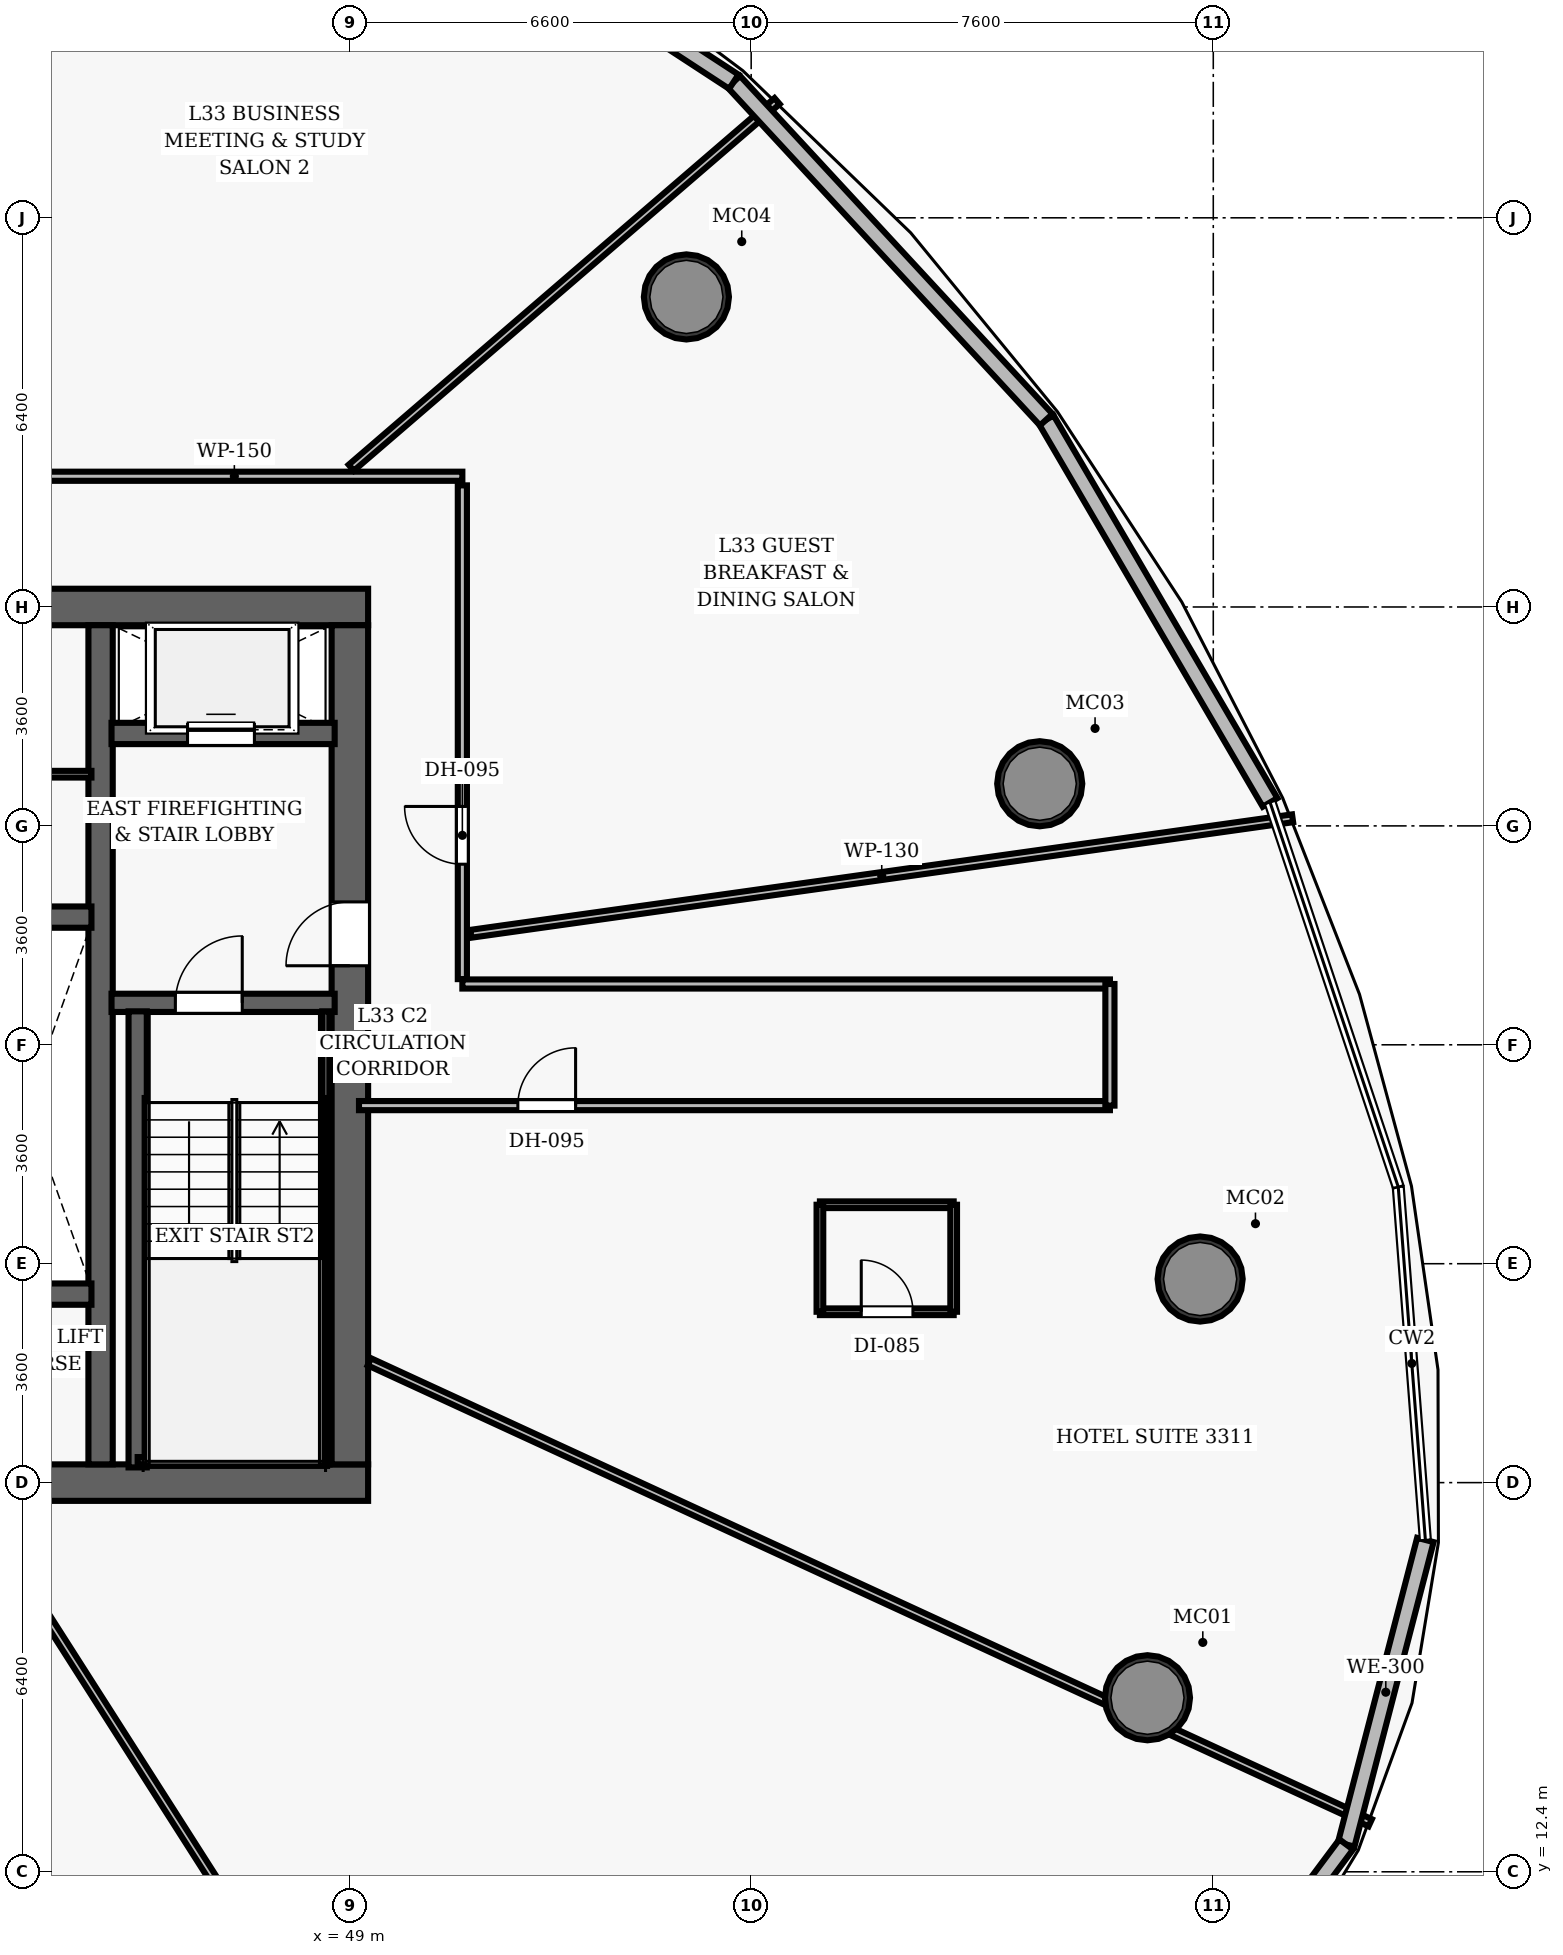
"""IFC4 building model, lengths in metres.
Left out: names, types, materials, properties, quantities, classifications, styles, units other than length and angle.
Written with IfcOpenShell. Run it as: python <this file> out.ifc"""

import sys

from ifc_helpers import new_model, si_unit, direction, frame, frame_2d, origin, origin_2d, place, context, subcontext, project, spatial, rectangle, hollow_circle, extrude, element, fill, save


model = new_model("IFC4")
c1 = context("Model", 3, precision=1e-05, world=origin(), true_north=direction((0.0, 1.0)))
c2 = subcontext(c1, "Body", "Model", "MODEL_VIEW")
j1 = project(units=[si_unit("LENGTHUNIT", "METRE"), si_unit("PLANEANGLEUNIT", "RADIAN")], contexts=[c1])
p1 = place(None, origin())
s1 = spatial("IfcSite", under=j1, at=p1, CompositionType="ELEMENT")
p2 = place(p1, origin())
s2 = spatial("IfcBuilding", under=s1, at=p2, CompositionType="ELEMENT")
p3 = place(p2, frame((0.0, 0.0, 134.3)))
s3 = spatial("IfcBuildingStorey", under=s2, at=p3, CompositionType="ELEMENT", Elevation=134.3)
p4 = place(p3, frame((26.7, 18.8, 0.0), z_axis=(0.0, 0.0, 1.0), x_axis=(1.0, 0.0, 0.0)))
e1 = element("IfcWall", 1, at=p4, inside=s3, PredefinedType="SHEAR", context=c2, shape_type="SweptSolid", body=[
    extrude(rectangle(XDim=22.6, YDim=0.6, at=frame_2d((11.3, 0.0))), origin(), (0.0, 0.0, 1.0), 3.5),
])
p5 = place(p4, frame((14.52, 0.0, 0.0)))
e2 = element("IfcOpeningElement", 2, at=p5, cuts=e1, PredefinedType="OPENING", context=c2, shape_type="SweptSolid", body=[
    extrude(rectangle(XDim=1.05, YDim=2.15, at=frame_2d((0.525, 1.075))), frame((0.0, 0.31, 0.0), z_axis=(0.0, -1.0, 0.0), x_axis=(1.0, 0.0, 0.0)), (0.0, 0.0, 1.0), 0.62),
])
p6 = place(p3, frame((26.7, 33.2, 0.0), z_axis=(0.0, 0.0, 1.0), x_axis=(1.0, 0.0, 0.0)))
e3 = element("IfcWall", 3, at=p6, inside=s3, PredefinedType="SHEAR", context=c2, shape_type="SweptSolid", body=[
    extrude(rectangle(XDim=22.6, YDim=0.6, at=frame_2d((11.3, 0.0))), origin(), (0.0, 0.0, 1.0), 3.5),
])
p7 = place(p6, frame((4.62, 0.0, 0.0)))
e4 = element("IfcOpeningElement", 4, at=p7, cuts=e3, PredefinedType="OPENING", context=c2, shape_type="SweptSolid", body=[
    extrude(rectangle(XDim=1.05, YDim=2.15, at=frame_2d((0.525, 1.075))), frame((0.0, 0.31, 0.0), z_axis=(0.0, -1.0, 0.0), x_axis=(1.0, 0.0, 0.0)), (0.0, 0.0, 1.0), 0.62),
])
p8 = place(p6, frame((14.52, 0.0, 0.0)))
e5 = element("IfcOpeningElement", 5, at=p8, cuts=e3, PredefinedType="OPENING", context=c2, shape_type="SweptSolid", body=[
    extrude(rectangle(XDim=1.05, YDim=2.15, at=frame_2d((0.525, 1.075))), frame((0.0, 0.31, 0.0), z_axis=(0.0, -1.0, 0.0), x_axis=(1.0, 0.0, 0.0)), (0.0, 0.0, 1.0), 0.62),
])
p9 = place(p3, frame((49.0, 19.1, 0.0), z_axis=(0.0, 0.0, 1.0), x_axis=(0.0, 1.0, 0.0)))
e6 = element("IfcWall", 6, at=p9, inside=s3, PredefinedType="SHEAR", context=c2, shape_type="SweptSolid", body=[
    extrude(rectangle(XDim=13.8, YDim=0.6, at=frame_2d((6.9, 0.0))), origin(), (0.0, 0.0, 1.0), 3.5),
])
p10 = place(p9, frame((8.2, 0.0, 0.0)))
e7 = element("IfcOpeningElement", 7, at=p10, cuts=e6, PredefinedType="OPENING", context=c2, shape_type="SweptSolid", body=[
    extrude(rectangle(XDim=1.05, YDim=2.15, at=frame_2d((0.525, 1.075))), frame((0.0, 0.31, 0.0), z_axis=(0.0, -1.0, 0.0), x_axis=(1.0, 0.0, 0.0)), (0.0, 0.0, 1.0), 0.62),
])
p11 = place(p3, frame((44.9, 19.1, 0.0), z_axis=(0.0, 0.0, 1.0), x_axis=(0.0, 1.0, 0.0)))
e8 = element("IfcWall", 8, at=p11, inside=s3, PredefinedType="SHEAR", context=c2, shape_type="SweptSolid", body=[
    extrude(rectangle(XDim=13.8, YDim=0.4, at=frame_2d((6.9, 0.0))), origin(), (0.0, 0.0, 1.0), 3.5),
])
for number, where, z_axis, x_axis in (
    (9, (62.118, 15.262, 0.0), (0.0, 0.0, 1.0), (1.0, 0.0, 0.0)),
    (10, (62.984, 22.148, 0.0), (0.0, 0.0, 1.0), (1.0, 0.0, 0.0)),
    (11, (60.346, 30.293, 0.0), (0.0, 0.0, 1.0), (1.0, 0.0, 0.0)),
    (12, (54.535, 38.299, 0.0), (0.0, 0.0, 1.0), (1.0, 0.0, 0.0)),
):
    element("IfcColumn", number, at=place(p3, frame(where, z_axis=z_axis, x_axis=x_axis)), inside=s3, PredefinedType="COLUMN", context=c2, shape_type="SweptSolid", body=[
        extrude(hollow_circle(Radius=0.7, WallThickness=0.055, at=origin_2d()), origin(), (0.0, 0.0, 1.0), 3.5),
    ])
p12 = place(p3, frame((45.08, 26.69, 0.0), z_axis=(0.0, 0.0, 1.0), x_axis=(1.0, 0.0, 0.0)))
e13 = element("IfcWall", 13, at=p12, inside=s3, PredefinedType="SHEAR", context=c2, shape_type="SweptSolid", body=[
    extrude(rectangle(XDim=3.67, YDim=0.3, at=frame_2d((1.835, 0.0))), origin(), (0.0, 0.0, 1.0), 3.5),
])
p13 = place(p12, frame((1.05, 0.0, 0.0)))
e14 = element("IfcOpeningElement", 14, at=p13, cuts=e13, PredefinedType="OPENING", context=c2, shape_type="SweptSolid", body=[
    extrude(rectangle(XDim=1.1, YDim=2.15, at=frame_2d((0.55, 1.075))), frame((0.0, 0.16, 0.0), z_axis=(0.0, -1.0, 0.0), x_axis=(1.0, 0.0, 0.0)), (0.0, 0.0, 1.0), 0.32),
])
p14 = place(p3, frame((45.51, 19.05, 0.0), z_axis=(0.0, 0.0, 1.0), x_axis=(0.0, 1.0, 0.0)))
e15 = element("IfcWall", 15, at=p14, inside=s3, PredefinedType="SHEAR", context=c2, shape_type="SweptSolid", body=[
    extrude(rectangle(XDim=7.5, YDim=0.3, at=frame_2d((3.75, 0.0))), origin(), (0.0, 0.0, 1.0), 3.5),
])
p15 = place(p3, frame((48.605, 19.1, 0.0), z_axis=(0.0, 0.0, 1.0), x_axis=(0.0, 1.0, 0.0)))
e16 = element("IfcWall", 16, at=p15, inside=s3, PredefinedType="SHEAR", context=c2, shape_type="SweptSolid", body=[
    extrude(rectangle(XDim=7.45, YDim=0.12, at=frame_2d((3.725, 0.0))), origin(), (0.0, 0.0, 1.0), 3.5),
])
p16 = place(p3, frame((45.51, 19.16, 0.0), z_axis=(0.0, 0.0, 1.0), x_axis=(1.0, 0.0, 0.0)))
e17 = element("IfcWall", 17, at=p16, inside=s3, PredefinedType="SHEAR", context=c2, shape_type="SweptSolid", body=[
    extrude(rectangle(XDim=3.095, YDim=0.12, at=frame_2d((1.547, 0.0))), origin(), (0.0, 0.0, 1.0), 3.5),
])
p17 = place(p3, frame((45.08, 31.12, 0.0), z_axis=(0.0, 0.0, 1.0), x_axis=(1.0, 0.0, 0.0)))
e18 = element("IfcWall", 18, at=p17, inside=s3, PredefinedType="SHEAR", context=c2, shape_type="SweptSolid", body=[
    extrude(rectangle(XDim=3.67, YDim=0.35, at=frame_2d((1.835, 0.0))), origin(), (0.0, 0.0, 1.0), 2.675),
])
p18 = place(p17, frame((1.25, 0.0, 0.0)))
e19 = element("IfcOpeningElement", 19, at=p18, cuts=e18, PredefinedType="OPENING", context=c2, shape_type="SweptSolid", body=[
    extrude(rectangle(XDim=1.1, YDim=2.15, at=frame_2d((0.55, 1.075))), frame((0.0, 0.185, 0.0), z_axis=(0.0, -1.0, 0.0), x_axis=(1.0, 0.0, 0.0)), (0.0, 0.0, 1.0), 0.37),
])
for number, where, z_axis, x_axis in (
    (20, (42.72, 21.9, 0.0), (0.0, 0.0, 1.0), (1.0, 0.0, 0.0)),
    (21, (42.72, 28.1, 0.0), (0.0, 0.0, 1.0), (1.0, 0.0, 0.0)),
):
    element("IfcWall", number, at=place(p3, frame(where, z_axis=z_axis, x_axis=x_axis)), inside=s3, PredefinedType="SHEAR", context=c2, shape_type="SweptSolid", body=[
        extrude(rectangle(XDim=2.03, YDim=0.35, at=frame_2d((1.015, 0.0))), origin(), (0.0, 0.0, 1.0), 2.675),
    ])
p19 = place(p3, frame((42.55, 30.45, 0.0), z_axis=(0.0, 0.0, 1.0), x_axis=(1.0, 0.0, 0.0)))
e22 = element("IfcWall", 22, at=p19, inside=s3, PredefinedType="PARTITIONING", context=c2, shape_type="SweptSolid", body=[
    extrude(rectangle(XDim=2.2, YDim=0.11, at=frame_2d((1.1, 0.0))), origin(), (0.0, 0.0, 1.0), 2.675),
])
p20 = place(p3, frame((24.85, 35.35, 0.0), z_axis=(0.0, 0.0, 1.0), x_axis=(1.0, 0.0, 0.0)))
e23 = element("IfcWall", 23, at=p20, inside=s3, PredefinedType="PARTITIONING", context=c2, shape_type="SweptSolid", body=[
    extrude(rectangle(XDim=26.0, YDim=0.15, at=frame_2d((13.0, 0.0))), origin(), (0.0, 0.0, 1.0), 2.675),
])
p21 = place(p20, frame((17.4, 0.0, 0.0)))
e24 = element("IfcOpeningElement", 24, at=p21, cuts=e23, PredefinedType="OPENING", context=c2, shape_type="SweptSolid", body=[
    extrude(rectangle(XDim=0.95, YDim=2.15, at=frame_2d((0.475, 1.075))), frame((0.0, 0.085, 0.0), z_axis=(0.0, -1.0, 0.0), x_axis=(1.0, 0.0, 0.0)), (0.0, 0.0, 1.0), 0.17),
])
p22 = place(p20, frame((12.708, 0.0, 0.0)))
e25 = element("IfcOpeningElement", 25, at=p22, cuts=e23, PredefinedType="OPENING", context=c2, shape_type="SweptSolid", body=[
    extrude(rectangle(XDim=0.95, YDim=2.15, at=frame_2d((0.475, 1.075))), frame((0.0, 0.085, 0.0), z_axis=(0.0, -1.0, 0.0), x_axis=(1.0, 0.0, 0.0)), (0.0, 0.0, 1.0), 0.17),
])
p23 = place(p20, frame((7.158, 0.0, 0.0)))
e26 = element("IfcOpeningElement", 26, at=p23, cuts=e23, PredefinedType="OPENING", context=c2, shape_type="SweptSolid", body=[
    extrude(rectangle(XDim=0.95, YDim=2.15, at=frame_2d((0.475, 1.075))), frame((0.0, 0.085, 0.0), z_axis=(0.0, -1.0, 0.0), x_axis=(1.0, 0.0, 0.0)), (0.0, 0.0, 1.0), 0.17),
])
p24 = place(p3, frame((50.85, 27.08, 0.0), z_axis=(0.0, 0.0, 1.0), x_axis=(0.0, 1.0, 0.0)))
e27 = element("IfcWall", 27, at=p24, inside=s3, PredefinedType="PARTITIONING", context=c2, shape_type="SweptSolid", body=[
    extrude(rectangle(XDim=8.12, YDim=0.15, at=frame_2d((4.06, 0.0))), origin(), (0.0, 0.0, 1.0), 2.675),
])
p25 = place(p24, frame((1.89, 0.0, 0.0)))
e28 = element("IfcOpeningElement", 28, at=p25, cuts=e27, PredefinedType="OPENING", context=c2, shape_type="SweptSolid", body=[
    extrude(rectangle(XDim=0.95, YDim=2.15, at=frame_2d((0.475, 1.075))), frame((0.0, 0.085, 0.0), z_axis=(0.0, -1.0, 0.0), x_axis=(1.0, 0.0, 0.0)), (0.0, 0.0, 1.0), 0.17),
])
p26 = place(p3, frame((50.85, 27.0, 0.0), z_axis=(0.0, 0.0, 1.0), x_axis=(1.0, 0.0, 0.0)))
e29 = element("IfcWall", 29, at=p26, inside=s3, PredefinedType="PARTITIONING", context=c2, shape_type="SweptSolid", body=[
    extrude(rectangle(XDim=10.65, YDim=0.15, at=frame_2d((5.325, 0.0))), origin(), (0.0, 0.0, 1.0), 2.675),
])
p27 = place(p3, frame((49.15, 25.0, 0.0), z_axis=(0.0, 0.0, 1.0), x_axis=(1.0, 0.0, 0.0)))
e30 = element("IfcWall", 30, at=p27, inside=s3, PredefinedType="PARTITIONING", context=c2, shape_type="SweptSolid", body=[
    extrude(rectangle(XDim=12.35, YDim=0.15, at=frame_2d((6.175, 0.0))), origin(), (0.0, 0.0, 1.0), 2.675),
])
p28 = place(p27, frame((2.613, 0.0, 0.0)))
e31 = element("IfcOpeningElement", 31, at=p28, cuts=e30, PredefinedType="OPENING", context=c2, shape_type="SweptSolid", body=[
    extrude(rectangle(XDim=0.95, YDim=2.15, at=frame_2d((0.475, 1.075))), frame((0.0, 0.085, 0.0), z_axis=(0.0, -1.0, 0.0), x_axis=(1.0, 0.0, 0.0)), (0.0, 0.0, 1.0), 0.17),
])
p29 = place(p3, frame((61.5, 25.0, 0.0), z_axis=(0.0, 0.0, 1.0), x_axis=(0.0, 1.0, 0.0)))
e32 = element("IfcWall", 32, at=p29, inside=s3, PredefinedType="PARTITIONING", context=c2, shape_type="SweptSolid", body=[
    extrude(rectangle(XDim=2.0, YDim=0.15, at=frame_2d((1.0, 0.0))), origin(), (0.0, 0.0, 1.0), 2.675),
])
p30 = place(p3, frame((50.99, 27.826, 0.0), z_axis=(0.0, 0.0, 1.0), x_axis=(0.990267175979, 0.13917945315, 0.0)))
e33 = element("IfcWall", 33, at=p30, inside=s3, PredefinedType="PARTITIONING", context=c2, shape_type="SweptSolid", body=[
    extrude(rectangle(XDim=13.647, YDim=0.13, at=frame_2d((6.824, 0.0))), origin(), (0.0, 0.0, 1.0), 2.675),
])
p31 = place(p3, frame((49.022, 35.49, 0.0), z_axis=(0.0, 0.0, 1.0), x_axis=(0.757817057359, 0.652467093098, 0.0)))
e34 = element("IfcWall", 34, at=p31, inside=s3, PredefinedType="PARTITIONING", context=c2, shape_type="SweptSolid", body=[
    extrude(rectangle(XDim=9.242, YDim=0.13, at=frame_2d((4.621, 0.0))), origin(), (0.0, 0.0, 1.0), 2.675),
])
p32 = place(p3, frame((40.819, 35.49, 0.0), z_axis=(0.0, 0.0, 1.0), x_axis=(0.284778226814, 0.958593428693, 0.0)))
e35 = element("IfcWall", 35, at=p32, inside=s3, PredefinedType="PARTITIONING", context=c2, shape_type="SweptSolid", body=[
    extrude(rectangle(XDim=12.975, YDim=0.13, at=frame_2d((6.488, 0.0))), origin(), (0.0, 0.0, 1.0), 2.675),
])
p33 = place(p3, frame((42.799, 18.48, 0.0), z_axis=(0.0, 0.0, 1.0), x_axis=(0.537959445607, -0.842970720063, 0.0)))
e36 = element("IfcWall", 36, at=p33, inside=s3, PredefinedType="PARTITIONING", context=c2, shape_type="SweptSolid", body=[
    extrude(rectangle(XDim=18.064, YDim=0.13, at=frame_2d((9.032, 0.0))), origin(), (0.0, 0.0, 1.0), 2.675),
])
p34 = place(p3, frame((49.32, 20.787, 0.0), z_axis=(0.0, 0.0, 1.0), x_axis=(0.908308798859, -0.418300281993, 0.0)))
e37 = element("IfcWall", 37, at=p34, inside=s3, PredefinedType="PARTITIONING", context=c2, shape_type="SweptSolid", body=[
    extrude(rectangle(XDim=18.123, YDim=0.13, at=frame_2d((9.062, 0.0))), origin(), (0.0, 0.0, 1.0), 2.675),
])
p35 = place(p3, frame((56.73, 21.61, 0.0), z_axis=(0.0, 0.0, 1.0), x_axis=(1.0, 0.0, 0.0)))
e38 = element("IfcWall", 38, at=p35, inside=s3, PredefinedType="PARTITIONING", context=c2, shape_type="SweptSolid", body=[
    extrude(rectangle(XDim=2.2, YDim=0.11, at=frame_2d((1.1, 0.0))), origin(), (0.0, 0.0, 1.0), 2.675),
])
p36 = place(p35, frame((0.68, 0.0, 0.0)))
e39 = element("IfcOpeningElement", 39, at=p36, cuts=e38, PredefinedType="OPENING", context=c2, shape_type="SweptSolid", body=[
    extrude(rectangle(XDim=0.85, YDim=2.1, at=frame_2d((0.425, 1.05))), frame((0.0, 0.065, 0.0), z_axis=(0.0, -1.0, 0.0), x_axis=(1.0, 0.0, 0.0)), (0.0, 0.0, 1.0), 0.13),
])
p37 = place(p3, frame((56.73, 23.37, 0.0), z_axis=(0.0, 0.0, 1.0), x_axis=(1.0, 0.0, 0.0)))
e40 = element("IfcWall", 40, at=p37, inside=s3, PredefinedType="PARTITIONING", context=c2, shape_type="SweptSolid", body=[
    extrude(rectangle(XDim=2.2, YDim=0.11, at=frame_2d((1.1, 0.0))), origin(), (0.0, 0.0, 1.0), 2.675),
])
for number, where, z_axis, x_axis in (
    (41, (56.73, 21.61, 0.0), (0.0, 0.0, 1.0), (0.0, 1.0, 0.0)),
    (42, (58.93, 21.61, 0.0), (0.0, 0.0, 1.0), (0.0, 1.0, 0.0)),
):
    element("IfcWall", number, at=place(p3, frame(where, z_axis=z_axis, x_axis=x_axis)), inside=s3, PredefinedType="PARTITIONING", context=c2, shape_type="SweptSolid", body=[
        extrude(rectangle(XDim=1.76, YDim=0.11, at=frame_2d((0.88, 0.0))), origin(), (0.0, 0.0, 1.0), 2.675),
    ])
p38 = place(p3, frame((66.688, 17.857, 0.0), z_axis=(0.0, 0.0, 1.0), x_axis=(-0.251584351693, -0.967835375456, 0.0)))
e43 = element("IfcWall", 43, at=p38, inside=s3, PredefinedType="SOLIDWALL", context=c2, shape_type="SweptSolid", body=[
    extrude(rectangle(XDim=5.174, YDim=0.28, at=frame_2d((2.587, 0.0))), origin(), (0.0, 0.0, 1.0), 3.26),
])
p39 = place(p3, frame((60.452, 36.28, 0.0), z_axis=(0.0, 0.0, 1.0), x_axis=(0.504896965015, -0.863179619036, 0.0)))
e44 = element("IfcWall", 44, at=p39, inside=s3, PredefinedType="SOLIDWALL", context=c2, shape_type="SweptSolid", body=[
    extrude(rectangle(XDim=7.292, YDim=0.28, at=frame_2d((3.646, 0.0))), origin(), (0.0, 0.0, 1.0), 3.26),
])
p40 = place(p3, frame((55.314, 41.838, 0.0), z_axis=(0.0, 0.0, 1.0), x_axis=(0.678806416745, -0.734317266981, 0.0)))
e45 = element("IfcWall", 45, at=p40, inside=s3, PredefinedType="SOLIDWALL", context=c2, shape_type="SweptSolid", body=[
    extrude(rectangle(XDim=7.569, YDim=0.28, at=frame_2d((3.785, 0.0))), origin(), (0.0, 0.0, 1.0), 3.26),
])
p41 = place(p3, frame((48.937, 46.003, 0.0), z_axis=(0.0, 0.0, 1.0), x_axis=(0.837254633375, -0.546813202925, 0.0)))
e46 = element("IfcWall", 46, at=p41, inside=s3, PredefinedType="SOLIDWALL", context=c2, shape_type="SweptSolid", body=[
    extrude(rectangle(XDim=7.617, YDim=0.28, at=frame_2d((3.809, 0.0))), origin(), (0.0, 0.0, 1.0), 3.26),
])
p42 = place(p3, frame((65.386, 12.849, 0.0), z_axis=(0.0, 0.0, 1.0), x_axis=(-0.598027873041, -0.80147530409, 0.0)))
e47 = element("IfcWall", 47, at=p42, inside=s3, PredefinedType="SOLIDWALL", context=c2, shape_type="SweptSolid", body=[
    extrude(rectangle(XDim=5.175, YDim=0.28, at=frame_2d((2.587, 0.0))), origin(), (0.0, 0.0, 1.0), 3.26),
])
p43 = place(p13, origin())
e48 = element("IfcDoor", 48, at=p43, inside=s3, OperationType="SINGLE_SWING_RIGHT", PredefinedType="DOOR", context=c2, shape_type="SweptSolid", body=[
    extrude(rectangle(XDim=1.1, YDim=2.15, at=frame_2d((0.55, 1.075))), frame((0.0, 0.025, 0.0), z_axis=(0.0, -1.0, 0.0), x_axis=(1.0, 0.0, 0.0)), (0.0, 0.0, 1.0), 0.05),
])
fill(e14, e48)
p44 = place(p10, origin())
e49 = element("IfcDoor", 49, at=p44, inside=s3, OperationType="SINGLE_SWING_LEFT", PredefinedType="DOOR", context=c2, shape_type="SweptSolid", body=[
    extrude(rectangle(XDim=1.05, YDim=2.15, at=frame_2d((0.525, 1.075))), frame((0.0, 0.025, 0.0), z_axis=(0.0, -1.0, 0.0), x_axis=(1.0, 0.0, 0.0)), (0.0, 0.0, 1.0), 0.05),
])
fill(e7, e49)
p45 = place(p25, origin())
e50 = element("IfcDoor", 50, at=p45, inside=s3, OperationType="SINGLE_SWING_RIGHT", PredefinedType="DOOR", context=c2, shape_type="SweptSolid", body=[
    extrude(rectangle(XDim=0.95, YDim=2.15, at=frame_2d((0.475, 1.075))), frame((0.0, 0.025, 0.0), z_axis=(0.0, -1.0, 0.0), x_axis=(1.0, 0.0, 0.0)), (0.0, 0.0, 1.0), 0.05),
])
fill(e28, e50)
p46 = place(p28, origin())
e51 = element("IfcDoor", 51, at=p46, inside=s3, OperationType="SINGLE_SWING_RIGHT", PredefinedType="DOOR", context=c2, shape_type="SweptSolid", body=[
    extrude(rectangle(XDim=0.95, YDim=2.15, at=frame_2d((0.475, 1.075))), frame((0.0, 0.025, 0.0), z_axis=(0.0, -1.0, 0.0), x_axis=(1.0, 0.0, 0.0)), (0.0, 0.0, 1.0), 0.05),
])
fill(e31, e51)
p47 = place(p36, origin())
e52 = element("IfcDoor", 52, at=p47, inside=s3, OperationType="SINGLE_SWING_LEFT", PredefinedType="DOOR", context=c2, shape_type="SweptSolid", body=[
    extrude(rectangle(XDim=0.85, YDim=2.1, at=frame_2d((0.425, 1.05))), frame((0.0, 0.025, 0.0), z_axis=(0.0, -1.0, 0.0), x_axis=(1.0, 0.0, 0.0)), (0.0, 0.0, 1.0), 0.05),
])
fill(e39, e52)
p48 = place(p18, origin())
e53 = element("IfcDoor", 53, at=p48, inside=s3, OperationType="SLIDING_TO_LEFT", PredefinedType="DOOR", context=c2, shape_type="SweptSolid", body=[
    extrude(rectangle(XDim=1.1, YDim=2.15, at=frame_2d((0.55, 1.075))), frame((0.0, 0.025, 0.0), z_axis=(0.0, -1.0, 0.0), x_axis=(1.0, 0.0, 0.0)), (0.0, 0.0, 1.0), 0.05),
])
fill(e19, e53)
save(model, sys.argv[1])
